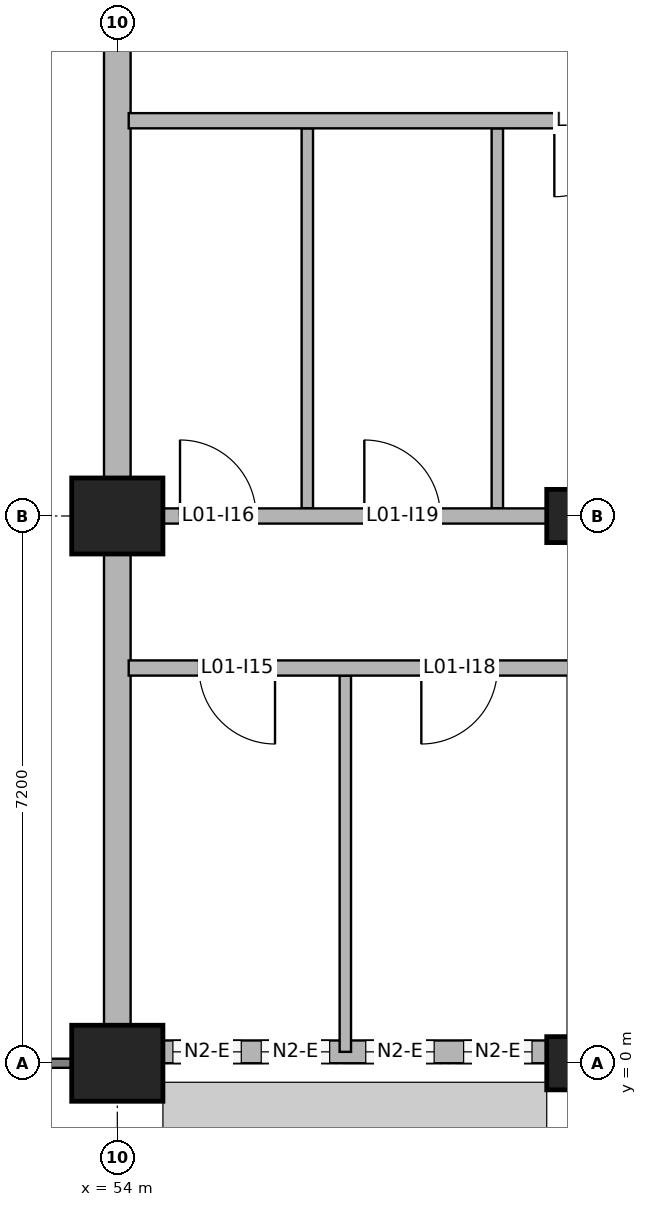
"""IFC4 building model, lengths in metres.
Left out: names, types, materials, properties, quantities, classifications, styles, units other than length and angle.
Written with IfcOpenShell. Run it as: python <this file> out.ifc"""

import sys

from ifc_helpers import new_model, si_unit, direction, frame, frame_2d, origin, origin_2d, place, context, subcontext, project, spatial, rectangle, extrude, element, fill, save


model = new_model("IFC4")
c1 = context("Model", 3, precision=1e-05, world=origin(), true_north=direction((0.0, 1.0)))
c2 = subcontext(c1, "Body", "Model", "MODEL_VIEW")
j1 = project(units=[si_unit("LENGTHUNIT", "METRE"), si_unit("PLANEANGLEUNIT", "RADIAN")], contexts=[c1])
p1 = place(None, origin())
s1 = spatial("IfcSite", under=j1, at=p1, CompositionType="ELEMENT")
p2 = place(p1, origin())
s2 = spatial("IfcBuilding", under=s1, at=p2, CompositionType="ELEMENT")
p3 = place(p2, frame((0.0, 0.0, 4.2)))
s3 = spatial("IfcBuildingStorey", under=s2, at=p3, CompositionType="ELEMENT", Elevation=4.2)
for number, where, z_axis, x_axis in (
    (1, (60.0, 0.0, 0.0), (0.0, 0.0, 1.0), (1.0, 0.0, 0.0)),
    (2, (60.0, 7.2, 0.0), (0.0, 0.0, 1.0), (1.0, 0.0, 0.0)),
):
    element("IfcColumn", number, at=place(p3, frame(where, z_axis=z_axis, x_axis=x_axis)), inside=s3, PredefinedType="COLUMN", context=c2, shape_type="SweptSolid", body=[
        extrude(rectangle(XDim=0.7, YDim=0.7, at=origin_2d()), origin(), (0.0, 0.0, 1.0), 3.95),
    ])
for number, where, z_axis, x_axis in (
    (3, (54.0, 0.0, 0.0), (0.0, 0.0, 1.0), (1.0, 0.0, 0.0)),
    (4, (54.0, 7.2, 0.0), (0.0, 0.0, 1.0), (1.0, 0.0, 0.0)),
):
    element("IfcColumn", number, at=place(p3, frame(where, z_axis=z_axis, x_axis=x_axis)), inside=s3, PredefinedType="COLUMN", context=c2, shape_type="SweptSolid", body=[
        extrude(rectangle(XDim=1.2, YDim=1.0, at=origin_2d()), origin(), (0.0, 0.0, 1.0), 4.091),
    ])
for number, where, z_axis, x_axis in (
    (5, (54.0, 0.5, 0.0), (0.0, 0.0, 1.0), (0.0, 1.0, 0.0)),
    (6, (54.0, 7.7, 0.0), (0.0, 0.0, 1.0), (0.0, 1.0, 0.0)),
):
    element("IfcWall", number, at=place(p3, frame(where, z_axis=z_axis, x_axis=x_axis)), inside=s3, PredefinedType="SOLIDWALL", context=c2, shape_type="SweptSolid", body=[
        extrude(rectangle(XDim=6.2, YDim=0.35, at=frame_2d((3.1, 0.0))), origin(), (0.0, 0.0, 1.0), 3.19),
    ])
p4 = place(p3, frame((54.6, 0.15, 0.0), z_axis=(0.0, 0.0, 1.0), x_axis=(1.0, 0.0, 0.0)))
e7 = element("IfcWall", 7, at=p4, inside=s3, PredefinedType="SOLIDWALL", context=c2, shape_type="SweptSolid", body=[
    extrude(rectangle(XDim=5.05, YDim=0.3, at=frame_2d((2.525, 0.0))), origin(), (0.0, 0.0, 1.0), 2.75),
])
p5 = place(p4, frame((0.131, 0.0, 0.9)))
e8 = element("IfcOpeningElement", 8, at=p5, cuts=e7, PredefinedType="OPENING", context=c2, shape_type="SweptSolid", body=[
    extrude(rectangle(XDim=0.9, YDim=1.2, at=frame_2d((0.45, 0.6))), frame((0.0, 0.16, 0.0), z_axis=(0.0, -1.0, 0.0), x_axis=(1.0, 0.0, 0.0)), (0.0, 0.0, 1.0), 0.32),
])
p6 = place(p4, frame((1.294, 0.0, 0.9)))
e9 = element("IfcOpeningElement", 9, at=p6, cuts=e7, PredefinedType="OPENING", context=c2, shape_type="SweptSolid", body=[
    extrude(rectangle(XDim=0.9, YDim=1.2, at=frame_2d((0.45, 0.6))), frame((0.0, 0.16, 0.0), z_axis=(0.0, -1.0, 0.0), x_axis=(1.0, 0.0, 0.0)), (0.0, 0.0, 1.0), 0.32),
])
p7 = place(p4, frame((2.669, 0.0, 0.9)))
e10 = element("IfcOpeningElement", 10, at=p7, cuts=e7, PredefinedType="OPENING", context=c2, shape_type="SweptSolid", body=[
    extrude(rectangle(XDim=0.9, YDim=1.2, at=frame_2d((0.45, 0.6))), frame((0.0, 0.16, 0.0), z_axis=(0.0, -1.0, 0.0), x_axis=(1.0, 0.0, 0.0)), (0.0, 0.0, 1.0), 0.32),
])
p8 = place(p4, frame((3.956, 0.0, 0.9)))
e11 = element("IfcOpeningElement", 11, at=p8, cuts=e7, PredefinedType="OPENING", context=c2, shape_type="SweptSolid", body=[
    extrude(rectangle(XDim=0.9, YDim=1.2, at=frame_2d((0.45, 0.6))), frame((0.0, 0.16, 0.0), z_axis=(0.0, -1.0, 0.0), x_axis=(1.0, 0.0, 0.0)), (0.0, 0.0, 1.0), 0.32),
])
p9 = place(p3, frame((56.5, 7.3, 0.0), z_axis=(0.0, 0.0, 1.0), x_axis=(0.0, 1.0, 0.0)))
e12 = element("IfcWall", 12, at=p9, inside=s3, PredefinedType="PARTITIONING", context=c2, shape_type="SweptSolid", body=[
    extrude(rectangle(XDim=5.0, YDim=0.15, at=frame_2d((2.5, 0.0))), origin(), (0.0, 0.0, 1.0), 2.75),
])
p10 = place(p3, frame((57.0, 0.15, 0.0), z_axis=(0.0, 0.0, 1.0), x_axis=(0.0, 1.0, 0.0)))
e13 = element("IfcWall", 13, at=p10, inside=s3, PredefinedType="PARTITIONING", context=c2, shape_type="SweptSolid", body=[
    extrude(rectangle(XDim=4.95, YDim=0.15, at=frame_2d((2.475, 0.0))), origin(), (0.0, 0.0, 1.0), 2.75),
])
p11 = place(p3, frame((59.0, 7.3, 0.0), z_axis=(0.0, 0.0, 1.0), x_axis=(0.0, 1.0, 0.0)))
e14 = element("IfcWall", 14, at=p11, inside=s3, PredefinedType="PARTITIONING", context=c2, shape_type="SweptSolid", body=[
    extrude(rectangle(XDim=5.0, YDim=0.15, at=frame_2d((2.5, 0.0))), origin(), (0.0, 0.0, 1.0), 2.75),
])
p12 = place(p3, frame((54.15, 5.2, 0.0), z_axis=(0.0, 0.0, 1.0), x_axis=(1.0, 0.0, 0.0)))
e15 = element("IfcWall", 15, at=p12, inside=s3, PredefinedType="PARTITIONING", context=c2, shape_type="SweptSolid", body=[
    extrude(rectangle(XDim=11.85, YDim=0.2, at=frame_2d((5.925, 0.0))), origin(), (0.0, 0.0, 1.0), 3.05),
])
p13 = place(p12, frame((0.925, 0.0, 0.0)))
e16 = element("IfcOpeningElement", 16, at=p13, cuts=e15, PredefinedType="OPENING", context=c2, shape_type="SweptSolid", body=[
    extrude(rectangle(XDim=1.0, YDim=2.1, at=frame_2d((0.5, 1.05))), frame((0.0, 0.11, 0.0), z_axis=(0.0, -1.0, 0.0), x_axis=(1.0, 0.0, 0.0)), (0.0, 0.0, 1.0), 0.22),
])
p14 = place(p12, frame((3.85, 0.0, 0.0)))
e17 = element("IfcOpeningElement", 17, at=p14, cuts=e15, PredefinedType="OPENING", context=c2, shape_type="SweptSolid", body=[
    extrude(rectangle(XDim=1.0, YDim=2.1, at=frame_2d((0.5, 1.05))), frame((0.0, 0.11, 0.0), z_axis=(0.0, -1.0, 0.0), x_axis=(1.0, 0.0, 0.0)), (0.0, 0.0, 1.0), 0.22),
])
p15 = place(p12, frame((6.85, 0.0, 0.0)))
e18 = element("IfcOpeningElement", 18, at=p15, cuts=e15, PredefinedType="OPENING", context=c2, shape_type="SweptSolid", body=[
    extrude(rectangle(XDim=1.0, YDim=2.1, at=frame_2d((0.5, 1.05))), frame((0.0, 0.11, 0.0), z_axis=(0.0, -1.0, 0.0), x_axis=(1.0, 0.0, 0.0)), (0.0, 0.0, 1.0), 0.22),
])
p16 = place(p12, frame((9.85, 0.0, 0.0)))
e19 = element("IfcOpeningElement", 19, at=p16, cuts=e15, PredefinedType="OPENING", context=c2, shape_type="SweptSolid", body=[
    extrude(rectangle(XDim=1.0, YDim=2.1, at=frame_2d((0.5, 1.05))), frame((0.0, 0.11, 0.0), z_axis=(0.0, -1.0, 0.0), x_axis=(1.0, 0.0, 0.0)), (0.0, 0.0, 1.0), 0.22),
])
p17 = place(p3, frame((54.6, 7.2, 0.0), z_axis=(0.0, 0.0, 1.0), x_axis=(1.0, 0.0, 0.0)))
e20 = element("IfcWall", 20, at=p17, inside=s3, PredefinedType="PARTITIONING", context=c2, shape_type="SweptSolid", body=[
    extrude(rectangle(XDim=5.05, YDim=0.2, at=frame_2d((2.525, 0.0))), origin(), (0.0, 0.0, 1.0), 2.75),
])
p18 = place(p17, frame((0.225, 0.0, 0.0)))
e21 = element("IfcOpeningElement", 21, at=p18, cuts=e20, PredefinedType="OPENING", context=c2, shape_type="SweptSolid", body=[
    extrude(rectangle(XDim=1.0, YDim=2.1, at=frame_2d((0.5, 1.05))), frame((0.0, 0.11, 0.0), z_axis=(0.0, -1.0, 0.0), x_axis=(1.0, 0.0, 0.0)), (0.0, 0.0, 1.0), 0.22),
])
p19 = place(p17, frame((2.65, 0.0, 0.0)))
e22 = element("IfcOpeningElement", 22, at=p19, cuts=e20, PredefinedType="OPENING", context=c2, shape_type="SweptSolid", body=[
    extrude(rectangle(XDim=1.0, YDim=2.1, at=frame_2d((0.5, 1.05))), frame((0.0, 0.11, 0.0), z_axis=(0.0, -1.0, 0.0), x_axis=(1.0, 0.0, 0.0)), (0.0, 0.0, 1.0), 0.22),
])
p20 = place(p3, frame((54.15, 12.4, 0.0), z_axis=(0.0, 0.0, 1.0), x_axis=(1.0, 0.0, 0.0)))
e23 = element("IfcWall", 23, at=p20, inside=s3, PredefinedType="PARTITIONING", context=c2, shape_type="SweptSolid", body=[
    extrude(rectangle(XDim=9.75, YDim=0.2, at=frame_2d((4.875, 0.0))), origin(), (0.0, 0.0, 1.0), 3.05),
])
p21 = place(p20, frame((5.6, 0.0, 0.0)))
e24 = element("IfcOpeningElement", 24, at=p21, cuts=e23, PredefinedType="OPENING", context=c2, shape_type="SweptSolid", body=[
    extrude(rectangle(XDim=1.0, YDim=2.1, at=frame_2d((0.5, 1.05))), frame((0.0, 0.11, 0.0), z_axis=(0.0, -1.0, 0.0), x_axis=(1.0, 0.0, 0.0)), (0.0, 0.0, 1.0), 0.22),
])
p22 = place(p5, origin())
e25 = element("IfcWindow", 25, at=p22, inside=s3, PartitioningType="SINGLE_PANEL", PredefinedType="WINDOW", context=c2, shape_type="SweptSolid", body=[
    extrude(rectangle(XDim=0.9, YDim=1.2, at=frame_2d((0.45, 0.6))), frame((0.0, 0.03, 0.0), z_axis=(0.0, -1.0, 0.0), x_axis=(1.0, 0.0, 0.0)), (0.0, 0.0, 1.0), 0.06),
])
fill(e8, e25)
p23 = place(p6, origin())
e26 = element("IfcWindow", 26, at=p23, inside=s3, PartitioningType="SINGLE_PANEL", PredefinedType="WINDOW", context=c2, shape_type="SweptSolid", body=[
    extrude(rectangle(XDim=0.9, YDim=1.2, at=frame_2d((0.45, 0.6))), frame((0.0, 0.03, 0.0), z_axis=(0.0, -1.0, 0.0), x_axis=(1.0, 0.0, 0.0)), (0.0, 0.0, 1.0), 0.06),
])
fill(e9, e26)
p24 = place(p7, origin())
e27 = element("IfcWindow", 27, at=p24, inside=s3, PartitioningType="SINGLE_PANEL", PredefinedType="WINDOW", context=c2, shape_type="SweptSolid", body=[
    extrude(rectangle(XDim=0.9, YDim=1.2, at=frame_2d((0.45, 0.6))), frame((0.0, 0.03, 0.0), z_axis=(0.0, -1.0, 0.0), x_axis=(1.0, 0.0, 0.0)), (0.0, 0.0, 1.0), 0.06),
])
fill(e10, e27)
p25 = place(p8, origin())
e28 = element("IfcWindow", 28, at=p25, inside=s3, PartitioningType="SINGLE_PANEL", PredefinedType="WINDOW", context=c2, shape_type="SweptSolid", body=[
    extrude(rectangle(XDim=0.9, YDim=1.2, at=frame_2d((0.45, 0.6))), frame((0.0, 0.03, 0.0), z_axis=(0.0, -1.0, 0.0), x_axis=(1.0, 0.0, 0.0)), (0.0, 0.0, 1.0), 0.06),
])
fill(e11, e28)
p26 = place(p13, frame((1.0, 0.0, 0.0), z_axis=(0.0, 0.0, 1.0), x_axis=(-1.0, 0.0, 0.0)))
e29 = element("IfcDoor", 29, at=p26, inside=s3, OperationType="SINGLE_SWING_LEFT", PredefinedType="DOOR", context=c2, shape_type="SweptSolid", body=[
    extrude(rectangle(XDim=1.0, YDim=2.1, at=frame_2d((0.5, 1.05))), frame((0.0, 0.025, 0.0), z_axis=(0.0, -1.0, 0.0), x_axis=(1.0, 0.0, 0.0)), (0.0, 0.0, 1.0), 0.05),
])
fill(e16, e29)
p27 = place(p18, origin())
e30 = element("IfcDoor", 30, at=p27, inside=s3, OperationType="SINGLE_SWING_LEFT", PredefinedType="DOOR", context=c2, shape_type="SweptSolid", body=[
    extrude(rectangle(XDim=1.0, YDim=2.1, at=frame_2d((0.5, 1.05))), frame((0.0, 0.025, 0.0), z_axis=(0.0, -1.0, 0.0), x_axis=(1.0, 0.0, 0.0)), (0.0, 0.0, 1.0), 0.05),
])
fill(e21, e30)
p28 = place(p14, frame((1.0, 0.0, 0.0), z_axis=(0.0, 0.0, 1.0), x_axis=(-1.0, 0.0, 0.0)))
e31 = element("IfcDoor", 31, at=p28, inside=s3, OperationType="SINGLE_SWING_RIGHT", PredefinedType="DOOR", context=c2, shape_type="SweptSolid", body=[
    extrude(rectangle(XDim=1.0, YDim=2.1, at=frame_2d((0.5, 1.05))), frame((0.0, 0.025, 0.0), z_axis=(0.0, -1.0, 0.0), x_axis=(1.0, 0.0, 0.0)), (0.0, 0.0, 1.0), 0.05),
])
fill(e17, e31)
p29 = place(p19, origin())
e32 = element("IfcDoor", 32, at=p29, inside=s3, OperationType="SINGLE_SWING_LEFT", PredefinedType="DOOR", context=c2, shape_type="SweptSolid", body=[
    extrude(rectangle(XDim=1.0, YDim=2.1, at=frame_2d((0.5, 1.05))), frame((0.0, 0.025, 0.0), z_axis=(0.0, -1.0, 0.0), x_axis=(1.0, 0.0, 0.0)), (0.0, 0.0, 1.0), 0.05),
])
fill(e22, e32)
p30 = place(p21, frame((1.0, 0.0, 0.0), z_axis=(0.0, 0.0, 1.0), x_axis=(-1.0, 0.0, 0.0)))
e33 = element("IfcDoor", 33, at=p30, inside=s3, OperationType="SINGLE_SWING_RIGHT", PredefinedType="DOOR", context=c2, shape_type="SweptSolid", body=[
    extrude(rectangle(XDim=1.0, YDim=2.1, at=frame_2d((0.5, 1.05))), frame((0.0, 0.025, 0.0), z_axis=(0.0, -1.0, 0.0), x_axis=(1.0, 0.0, 0.0)), (0.0, 0.0, 1.0), 0.05),
])
fill(e24, e33)
save(model, sys.argv[1])
